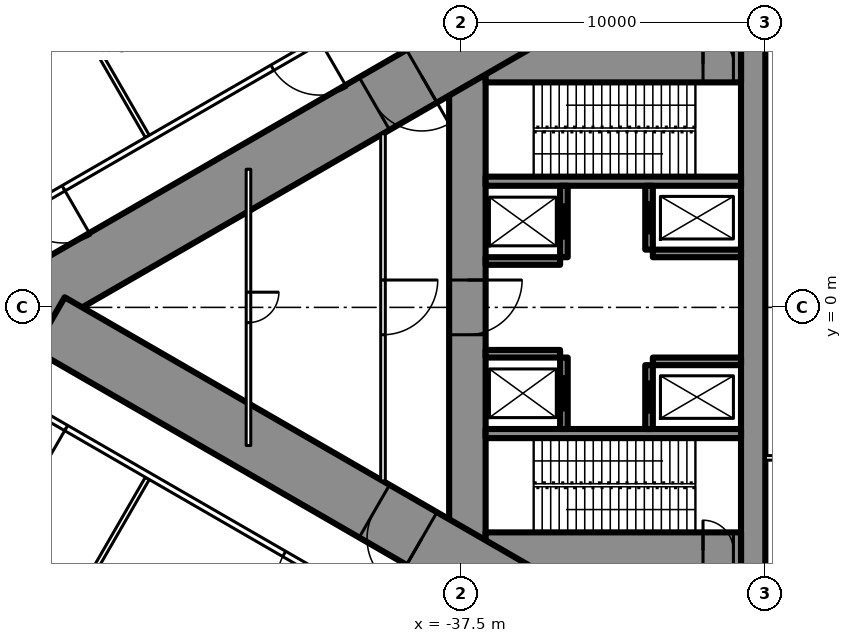
"""IFC4 building model, lengths in metres.
Left out: names, types, materials, properties, quantities, classifications, styles, units other than length and angle.
Written with IfcOpenShell. Run it as: python <this file> out.ifc"""

import sys

from ifc_helpers import new_model, si_unit, direction, frame, frame_2d, origin, place, context, subcontext, project, spatial, rectangle, extrude, element, fill, save


model = new_model("IFC4")
c1 = context("Model", 3, precision=1e-05, world=origin(), true_north=direction((0.0, 1.0)))
c2 = subcontext(c1, "Body", "Model", "MODEL_VIEW")
j1 = project(units=[si_unit("LENGTHUNIT", "METRE"), si_unit("PLANEANGLEUNIT", "RADIAN")], contexts=[c1])
p1 = place(None, origin())
s1 = spatial("IfcSite", under=j1, at=p1, CompositionType="ELEMENT")
p2 = place(p1, origin())
s2 = spatial("IfcBuilding", under=s1, at=p2, CompositionType="ELEMENT")
p3 = place(p2, origin())
s3 = spatial("IfcBuildingStorey", under=s2, at=p3, CompositionType="ELEMENT", Elevation=0.0)
p4 = place(p3, frame((-27.9, 8.6, 0.0), z_axis=(0.0, 0.0, 1.0), x_axis=(0.0, -1.0, 0.0)))
e1 = element("IfcWall", 1, at=p4, inside=s3, PredefinedType="SHEAR", context=c2, shape_type="SweptSolid", body=[
    extrude(rectangle(XDim=17.2, YDim=0.8, at=frame_2d((8.6, 0.0))), origin(), (0.0, 0.0, 1.0), 7.2),
])
p5 = place(p3, frame((-37.3, 8.6, 0.0), z_axis=(0.0, 0.0, 1.0), x_axis=(0.0, -1.0, 0.0)))
e2 = element("IfcWall", 2, at=p5, inside=s3, PredefinedType="SHEAR", context=c2, shape_type="SweptSolid", body=[
    extrude(rectangle(XDim=17.2, YDim=1.2, at=frame_2d((8.6, 0.0))), origin(), (0.0, 0.0, 1.0), 7.2),
])
p6 = place(p5, frame((7.7, 0.0, 0.0)))
e3 = element("IfcOpeningElement", 3, at=p6, cuts=e2, PredefinedType="OPENING", context=c2, shape_type="SweptSolid", body=[
    extrude(rectangle(XDim=1.8, YDim=2.2, at=frame_2d((0.9, 1.1))), frame((0.0, 0.61, 0.0), z_axis=(0.0, -1.0, 0.0), x_axis=(1.0, 0.0, 0.0)), (0.0, 0.0, 1.0), 1.22),
])
p7 = place(p3, frame((-28.3, 8.0, 0.0), z_axis=(0.0, 0.0, 1.0), x_axis=(-1.0, 0.0, 0.0)))
e4 = element("IfcWall", 4, at=p7, inside=s3, PredefinedType="SHEAR", context=c2, shape_type="SweptSolid", body=[
    extrude(rectangle(XDim=8.4, YDim=1.2, at=frame_2d((4.2, 0.0))), origin(), (0.0, 0.0, 1.0), 7.2),
])
p8 = place(p7, frame((0.25, 0.0, 0.0)))
e5 = element("IfcOpeningElement", 5, at=p8, cuts=e4, PredefinedType="OPENING", context=c2, shape_type="SweptSolid", body=[
    extrude(rectangle(XDim=1.0, YDim=2.2, at=frame_2d((0.5, 1.1))), frame((0.0, 0.61, 0.0), z_axis=(0.0, -1.0, 0.0), x_axis=(1.0, 0.0, 0.0)), (0.0, 0.0, 1.0), 1.22),
])
p9 = place(p3, frame((-28.3, -8.0, 0.0), z_axis=(0.0, 0.0, 1.0), x_axis=(-1.0, 0.0, 0.0)))
e6 = element("IfcWall", 6, at=p9, inside=s3, PredefinedType="SHEAR", context=c2, shape_type="SweptSolid", body=[
    extrude(rectangle(XDim=8.4, YDim=1.2, at=frame_2d((4.2, 0.0))), origin(), (0.0, 0.0, 1.0), 7.2),
])
p10 = place(p9, frame((0.25, 0.0, 0.0)))
e7 = element("IfcOpeningElement", 7, at=p10, cuts=e6, PredefinedType="OPENING", context=c2, shape_type="SweptSolid", body=[
    extrude(rectangle(XDim=1.0, YDim=2.2, at=frame_2d((0.5, 1.1))), frame((0.0, 0.61, 0.0), z_axis=(0.0, -1.0, 0.0), x_axis=(1.0, 0.0, 0.0)), (0.0, 0.0, 1.0), 1.22),
])
for number, where, z_axis, x_axis in (
    (8, (-28.3, 4.15, 0.0), (0.0, 0.0, 1.0), (-1.0, 0.0, 0.0)),
    (9, (-28.3, -4.15, 0.0), (0.0, 0.0, 1.0), (-1.0, 0.0, 0.0)),
):
    element("IfcWall", number, at=place(p3, frame(where, z_axis=z_axis, x_axis=x_axis)), inside=s3, PredefinedType="SHEAR", context=c2, shape_type="SweptSolid", body=[
        extrude(rectangle(XDim=8.4, YDim=0.3, at=frame_2d((4.2, 0.0))), origin(), (0.0, 0.0, 1.0), 7.2),
    ])
p11 = place(p3, frame((-31.325, 4.0, 0.0), z_axis=(0.0, 0.0, 1.0), x_axis=(0.0, -1.0, 0.0)))
e10 = element("IfcWall", 10, at=p11, inside=s3, PredefinedType="SHEAR", context=c2, shape_type="SweptSolid", body=[
    extrude(rectangle(XDim=2.1, YDim=0.25, at=frame_2d((1.05, 0.0))), origin(), (0.0, 0.0, 1.0), 7.2),
])
p12 = place(p11, frame((0.5, 0.0, 0.0)))
e11 = element("IfcOpeningElement", 11, at=p12, cuts=e10, PredefinedType="OPENING", context=c2, shape_type="SweptSolid", body=[
    extrude(rectangle(XDim=1.1, YDim=2.2, at=frame_2d((0.55, 1.1))), frame((0.0, 0.135, 0.0), z_axis=(0.0, -1.0, 0.0), x_axis=(1.0, 0.0, 0.0)), (0.0, 0.0, 1.0), 0.27),
])
p13 = place(p3, frame((-34.125, 4.0, 0.0), z_axis=(0.0, 0.0, 1.0), x_axis=(0.0, -1.0, 0.0)))
e12 = element("IfcWall", 12, at=p13, inside=s3, PredefinedType="SHEAR", context=c2, shape_type="SweptSolid", body=[
    extrude(rectangle(XDim=2.35, YDim=0.25, at=frame_2d((1.175, 0.0))), origin(), (0.0, 0.0, 1.0), 7.2),
])
p14 = place(p13, frame((0.575, 0.0, 0.0)))
e13 = element("IfcOpeningElement", 13, at=p14, cuts=e12, PredefinedType="OPENING", context=c2, shape_type="SweptSolid", body=[
    extrude(rectangle(XDim=1.2, YDim=2.2, at=frame_2d((0.6, 1.1))), frame((0.0, 0.135, 0.0), z_axis=(0.0, -1.0, 0.0), x_axis=(1.0, 0.0, 0.0)), (0.0, 0.0, 1.0), 0.27),
])
p15 = place(p3, frame((-28.3, 1.775, 0.0), z_axis=(0.0, 0.0, 1.0), x_axis=(-1.0, 0.0, 0.0)))
e14 = element("IfcWall", 14, at=p15, inside=s3, PredefinedType="SHEAR", context=c2, shape_type="SweptSolid", body=[
    extrude(rectangle(XDim=2.9, YDim=0.25, at=frame_2d((1.45, 0.0))), origin(), (0.0, 0.0, 1.0), 7.2),
])
p16 = place(p3, frame((-34.25, 1.525, 0.0), z_axis=(0.0, 0.0, 1.0), x_axis=(-1.0, 0.0, 0.0)))
e15 = element("IfcWall", 15, at=p16, inside=s3, PredefinedType="SHEAR", context=c2, shape_type="SweptSolid", body=[
    extrude(rectangle(XDim=2.45, YDim=0.25, at=frame_2d((1.225, 0.0))), origin(), (0.0, 0.0, 1.0), 7.2),
])
p17 = place(p3, frame((-31.325, -1.9, 0.0), z_axis=(0.0, 0.0, 1.0), x_axis=(0.0, -1.0, 0.0)))
e16 = element("IfcWall", 16, at=p17, inside=s3, PredefinedType="SHEAR", context=c2, shape_type="SweptSolid", body=[
    extrude(rectangle(XDim=2.1, YDim=0.25, at=frame_2d((1.05, 0.0))), origin(), (0.0, 0.0, 1.0), 7.2),
])
p18 = place(p17, frame((0.5, 0.0, 0.0)))
e17 = element("IfcOpeningElement", 17, at=p18, cuts=e16, PredefinedType="OPENING", context=c2, shape_type="SweptSolid", body=[
    extrude(rectangle(XDim=1.1, YDim=2.2, at=frame_2d((0.55, 1.1))), frame((0.0, 0.135, 0.0), z_axis=(0.0, -1.0, 0.0), x_axis=(1.0, 0.0, 0.0)), (0.0, 0.0, 1.0), 0.27),
])
p19 = place(p3, frame((-34.125, -1.65, 0.0), z_axis=(0.0, 0.0, 1.0), x_axis=(0.0, -1.0, 0.0)))
e18 = element("IfcWall", 18, at=p19, inside=s3, PredefinedType="SHEAR", context=c2, shape_type="SweptSolid", body=[
    extrude(rectangle(XDim=2.35, YDim=0.25, at=frame_2d((1.175, 0.0))), origin(), (0.0, 0.0, 1.0), 7.2),
])
p20 = place(p19, frame((0.575, 0.0, 0.0)))
e19 = element("IfcOpeningElement", 19, at=p20, cuts=e18, PredefinedType="OPENING", context=c2, shape_type="SweptSolid", body=[
    extrude(rectangle(XDim=1.2, YDim=2.2, at=frame_2d((0.6, 1.1))), frame((0.0, 0.135, 0.0), z_axis=(0.0, -1.0, 0.0), x_axis=(1.0, 0.0, 0.0)), (0.0, 0.0, 1.0), 0.27),
])
p21 = place(p3, frame((-28.3, -1.775, 0.0), z_axis=(0.0, 0.0, 1.0), x_axis=(-1.0, 0.0, 0.0)))
e20 = element("IfcWall", 20, at=p21, inside=s3, PredefinedType="SHEAR", context=c2, shape_type="SweptSolid", body=[
    extrude(rectangle(XDim=2.9, YDim=0.25, at=frame_2d((1.45, 0.0))), origin(), (0.0, 0.0, 1.0), 7.2),
])
p22 = place(p3, frame((-34.25, -1.525, 0.0), z_axis=(0.0, 0.0, 1.0), x_axis=(-1.0, 0.0, 0.0)))
e21 = element("IfcWall", 21, at=p22, inside=s3, PredefinedType="SHEAR", context=c2, shape_type="SweptSolid", body=[
    extrude(rectangle(XDim=2.45, YDim=0.25, at=frame_2d((1.225, 0.0))), origin(), (0.0, 0.0, 1.0), 7.2),
])
p23 = place(p3, frame((-27.2, 14.3, 0.0), z_axis=(0.0, 0.0, 1.0), x_axis=(-0.866026593062, -0.499997940104, 0.0)))
e22 = element("IfcWall", 22, at=p23, inside=s3, PredefinedType="SHEAR", context=c2, shape_type="SweptSolid", body=[
    extrude(rectangle(XDim=28.946, YDim=2.0, at=frame_2d((14.473, 0.0))), origin(), (0.0, 0.0, 1.0), 7.2),
])
p24 = place(p23, frame((4.6, 0.0, 0.0)))
e23 = element("IfcOpeningElement", 23, at=p24, cuts=e22, PredefinedType="OPENING", context=c2, shape_type="SweptSolid", body=[
    extrude(rectangle(XDim=1.0, YDim=2.2, at=frame_2d((0.5, 1.1))), frame((0.0, 1.01, 0.0), z_axis=(0.0, -1.0, 0.0), x_axis=(1.0, 0.0, 0.0)), (0.0, 0.0, 1.0), 2.02),
])
p25 = place(p23, frame((13.395, 0.0, 0.0)))
e24 = element("IfcOpeningElement", 24, at=p25, cuts=e22, PredefinedType="OPENING", context=c2, shape_type="SweptSolid", body=[
    extrude(rectangle(XDim=1.8, YDim=2.2, at=frame_2d((0.9, 1.1))), frame((0.0, 1.01, 0.0), z_axis=(0.0, -1.0, 0.0), x_axis=(1.0, 0.0, 0.0)), (0.0, 0.0, 1.0), 2.02),
])
p26 = place(p3, frame((-27.2, -14.3, 0.0), z_axis=(0.0, 0.0, 1.0), x_axis=(-0.866024044937, 0.500002353585, 0.0)))
e25 = element("IfcWall", 25, at=p26, inside=s3, PredefinedType="SHEAR", context=c2, shape_type="SweptSolid", body=[
    extrude(rectangle(XDim=27.533, YDim=2.0, at=frame_2d((13.767, 0.0))), origin(), (0.0, 0.0, 1.0), 7.2),
])
p27 = place(p26, frame((4.6, 0.0, 0.0)))
e26 = element("IfcOpeningElement", 26, at=p27, cuts=e25, PredefinedType="OPENING", context=c2, shape_type="SweptSolid", body=[
    extrude(rectangle(XDim=1.0, YDim=2.2, at=frame_2d((0.5, 1.1))), frame((0.0, 1.01, 0.0), z_axis=(0.0, -1.0, 0.0), x_axis=(1.0, 0.0, 0.0)), (0.0, 0.0, 1.0), 2.02),
])
p28 = place(p26, frame((13.395, 0.0, 0.0)))
e27 = element("IfcOpeningElement", 27, at=p28, cuts=e25, PredefinedType="OPENING", context=c2, shape_type="SweptSolid", body=[
    extrude(rectangle(XDim=1.8, YDim=2.2, at=frame_2d((0.9, 1.1))), frame((0.0, 1.01, 0.0), z_axis=(0.0, -1.0, 0.0), x_axis=(1.0, 0.0, 0.0)), (0.0, 0.0, 1.0), 2.02),
])
for number, where, z_axis, x_axis in (
    (28, (-47.827, 5.624, 0.0), (0.0, 0.0, 1.0), (-0.5, 0.866, 0.0)),
    (29, (-47.827, -5.624, 0.0), (0.0, 0.0, 1.0), (-0.5, -0.866, 0.0)),
):
    element("IfcWall", number, at=place(p3, frame(where, z_axis=z_axis, x_axis=x_axis)), inside=s3, PredefinedType="PARTITIONING", context=c2, shape_type="SweptSolid", body=[
        extrude(rectangle(XDim=9.11, YDim=0.15, at=frame_2d((4.555, 0.0))), origin(), (0.0, 0.0, 1.0), 5.85),
    ])
p29 = place(p3, frame((-37.9, 11.24, 0.0), z_axis=(0.0, 0.0, 1.0), x_axis=(-0.866022995118, -0.50000417191, 0.0)))
e30 = element("IfcWall", 30, at=p29, inside=s3, PredefinedType="PARTITIONING", context=c2, shape_type="SweptSolid", body=[
    extrude(rectangle(XDim=22.48, YDim=0.2, at=frame_2d((11.24, 0.0))), origin(), (0.0, 0.0, 1.0), 6.85),
])
p30 = place(p29, frame((14.644, 0.0, 0.0)))
e31 = element("IfcOpeningElement", 31, at=p30, cuts=e30, PredefinedType="OPENING", context=c2, shape_type="SweptSolid", body=[
    extrude(rectangle(XDim=1.8, YDim=2.2, at=frame_2d((0.9, 1.1))), frame((0.0, 0.11, 0.0), z_axis=(0.0, -1.0, 0.0), x_axis=(1.0, 0.0, 0.0)), (0.0, 0.0, 1.0), 0.22),
])
p31 = place(p29, frame((20.069, 0.0, 0.0)))
e32 = element("IfcOpeningElement", 32, at=p31, cuts=e30, PredefinedType="OPENING", context=c2, shape_type="SweptSolid", body=[
    extrude(rectangle(XDim=1.8, YDim=2.2, at=frame_2d((0.9, 1.1))), frame((0.0, 0.11, 0.0), z_axis=(0.0, -1.0, 0.0), x_axis=(1.0, 0.0, 0.0)), (0.0, 0.0, 1.0), 0.22),
])
p32 = place(p29, frame((4.915, 0.0, 0.0)))
e33 = element("IfcOpeningElement", 33, at=p32, cuts=e30, PredefinedType="OPENING", context=c2, shape_type="SweptSolid", body=[
    extrude(rectangle(XDim=1.8, YDim=2.2, at=frame_2d((0.9, 1.1))), frame((0.0, 0.11, 0.0), z_axis=(0.0, -1.0, 0.0), x_axis=(1.0, 0.0, 0.0)), (0.0, 0.0, 1.0), 0.22),
])
p33 = place(p3, frame((-37.12, -11.69, 0.0), z_axis=(0.0, 0.0, 1.0), x_axis=(-0.866028803602, 0.499994111297, 0.0)))
e34 = element("IfcWall", 34, at=p33, inside=s3, PredefinedType="PARTITIONING", context=c2, shape_type="SweptSolid", body=[
    extrude(rectangle(XDim=23.26, YDim=0.2, at=frame_2d((11.63, 0.0))), origin(), (0.0, 0.0, 1.0), 6.85),
])
p34 = place(p33, frame((20.909, 0.0, 0.0)))
e35 = element("IfcOpeningElement", 35, at=p34, cuts=e34, PredefinedType="OPENING", context=c2, shape_type="SweptSolid", body=[
    extrude(rectangle(XDim=1.8, YDim=2.2, at=frame_2d((0.9, 1.1))), frame((0.0, 0.11, 0.0), z_axis=(0.0, -1.0, 0.0), x_axis=(1.0, 0.0, 0.0)), (0.0, 0.0, 1.0), 0.22),
])
p35 = place(p33, frame((15.444, 0.0, 0.0)))
e36 = element("IfcOpeningElement", 36, at=p35, cuts=e34, PredefinedType="OPENING", context=c2, shape_type="SweptSolid", body=[
    extrude(rectangle(XDim=2.0, YDim=2.4, at=frame_2d((1.0, 1.2))), frame((0.0, 0.11, 0.0), z_axis=(0.0, -1.0, 0.0), x_axis=(1.0, 0.0, 0.0)), (0.0, 0.0, 1.0), 0.22),
])
p36 = place(p33, frame((5.365, 0.0, 0.0)))
e37 = element("IfcOpeningElement", 37, at=p36, cuts=e34, PredefinedType="OPENING", context=c2, shape_type="SweptSolid", body=[
    extrude(rectangle(XDim=1.8, YDim=2.2, at=frame_2d((0.9, 1.1))), frame((0.0, 0.11, 0.0), z_axis=(0.0, -1.0, 0.0), x_axis=(1.0, 0.0, 0.0)), (0.0, 0.0, 1.0), 0.22),
])
p37 = place(p3, frame((-40.075, 5.712, 0.0), z_axis=(0.0, 0.0, 1.0), x_axis=(0.0, -1.0, 0.0)))
e38 = element("IfcWall", 38, at=p37, inside=s3, PredefinedType="PARTITIONING", context=c2, shape_type="SweptSolid", body=[
    extrude(rectangle(XDim=11.424, YDim=0.15, at=frame_2d((5.712, 0.0))), origin(), (0.0, 0.0, 1.0), 6.85),
])
p38 = place(p37, frame((4.812, 0.0, 0.0)))
e39 = element("IfcOpeningElement", 39, at=p38, cuts=e38, PredefinedType="OPENING", context=c2, shape_type="SweptSolid", body=[
    extrude(rectangle(XDim=1.8, YDim=2.2, at=frame_2d((0.9, 1.1))), frame((0.0, 0.085, 0.0), z_axis=(0.0, -1.0, 0.0), x_axis=(1.0, 0.0, 0.0)), (0.0, 0.0, 1.0), 0.17),
])
p39 = place(p3, frame((-44.5, 4.543, 0.0), z_axis=(0.0, 0.0, 1.0), x_axis=(0.0, -1.0, 0.0)))
e40 = element("IfcWall", 40, at=p39, inside=s3, PredefinedType="PARTITIONING", context=c2, shape_type="SweptSolid", body=[
    extrude(rectangle(XDim=9.085, YDim=0.15, at=frame_2d((4.543, 0.0))), origin(), (0.0, 0.0, 1.0), 6.85),
])
p40 = place(p39, frame((4.043, 0.0, 0.0)))
e41 = element("IfcOpeningElement", 41, at=p40, cuts=e40, PredefinedType="OPENING", context=c2, shape_type="SweptSolid", body=[
    extrude(rectangle(XDim=1.0, YDim=2.2, at=frame_2d((0.5, 1.1))), frame((0.0, 0.085, 0.0), z_axis=(0.0, -1.0, 0.0), x_axis=(1.0, 0.0, 0.0)), (0.0, 0.0, 1.0), 0.17),
])
p41 = place(p3, frame((-27.5, -4.95, 0.0), z_axis=(0.0, 0.0, 1.0), x_axis=(1.0, 0.0, 0.0)))
e42 = element("IfcWall", 42, at=p41, inside=s3, PredefinedType="PARTITIONING", context=c2, shape_type="SweptSolid", body=[
    extrude(rectangle(XDim=22.875, YDim=0.15, at=frame_2d((11.438, 0.0))), origin(), (0.0, 0.0, 1.0), 5.85),
])
p42 = place(p41, frame((9.1, 0.0, 0.0)))
e43 = element("IfcOpeningElement", 43, at=p42, cuts=e42, PredefinedType="OPENING", context=c2, shape_type="SweptSolid", body=[
    extrude(rectangle(XDim=1.8, YDim=2.2, at=frame_2d((0.9, 1.1))), frame((0.0, 0.085, 0.0), z_axis=(0.0, -1.0, 0.0), x_axis=(1.0, 0.0, 0.0)), (0.0, 0.0, 1.0), 0.17),
])
p43 = place(p30, origin())
e44 = element("IfcDoor", 44, at=p43, inside=s3, OperationType="DOUBLE_DOOR_SINGLE_SWING", PredefinedType="DOOR", context=c2, shape_type="SweptSolid", body=[
    extrude(rectangle(XDim=1.8, YDim=2.2, at=frame_2d((0.9, 1.1))), frame((0.0, 0.025, 0.0), z_axis=(0.0, -1.0, 0.0), x_axis=(1.0, 0.0, 0.0)), (0.0, 0.0, 1.0), 0.05),
])
fill(e31, e44)
p44 = place(p35, origin())
e45 = element("IfcDoor", 45, at=p44, inside=s3, OperationType="DOUBLE_DOOR_SINGLE_SWING", PredefinedType="DOOR", context=c2, shape_type="SweptSolid", body=[
    extrude(rectangle(XDim=2.0, YDim=2.4, at=frame_2d((1.0, 1.2))), frame((0.0, 0.025, 0.0), z_axis=(0.0, -1.0, 0.0), x_axis=(1.0, 0.0, 0.0)), (0.0, 0.0, 1.0), 0.05),
])
fill(e36, e45)
p45 = place(p36, origin())
e46 = element("IfcDoor", 46, at=p45, inside=s3, OperationType="DOUBLE_DOOR_SINGLE_SWING", PredefinedType="DOOR", context=c2, shape_type="SweptSolid", body=[
    extrude(rectangle(XDim=1.8, YDim=2.2, at=frame_2d((0.9, 1.1))), frame((0.0, 0.025, 0.0), z_axis=(0.0, -1.0, 0.0), x_axis=(1.0, 0.0, 0.0)), (0.0, 0.0, 1.0), 0.05),
])
fill(e37, e46)
p46 = place(p32, origin())
e47 = element("IfcDoor", 47, at=p46, inside=s3, OperationType="DOUBLE_DOOR_SINGLE_SWING", PredefinedType="DOOR", context=c2, shape_type="SweptSolid", body=[
    extrude(rectangle(XDim=1.8, YDim=2.2, at=frame_2d((0.9, 1.1))), frame((0.0, 0.025, 0.0), z_axis=(0.0, -1.0, 0.0), x_axis=(1.0, 0.0, 0.0)), (0.0, 0.0, 1.0), 0.05),
])
fill(e33, e47)
p47 = place(p38, origin())
e48 = element("IfcDoor", 48, at=p47, inside=s3, OperationType="DOUBLE_DOOR_SINGLE_SWING", PredefinedType="DOOR", context=c2, shape_type="SweptSolid", body=[
    extrude(rectangle(XDim=1.8, YDim=2.2, at=frame_2d((0.9, 1.1))), frame((0.0, 0.025, 0.0), z_axis=(0.0, -1.0, 0.0), x_axis=(1.0, 0.0, 0.0)), (0.0, 0.0, 1.0), 0.05),
])
fill(e39, e48)
p48 = place(p40, origin())
e49 = element("IfcDoor", 49, at=p48, inside=s3, OperationType="SINGLE_SWING_LEFT", PredefinedType="DOOR", context=c2, shape_type="SweptSolid", body=[
    extrude(rectangle(XDim=1.0, YDim=2.2, at=frame_2d((0.5, 1.1))), frame((0.0, 0.025, 0.0), z_axis=(0.0, -1.0, 0.0), x_axis=(1.0, 0.0, 0.0)), (0.0, 0.0, 1.0), 0.05),
])
fill(e41, e49)
p49 = place(p25, origin())
e50 = element("IfcDoor", 50, at=p49, inside=s3, OperationType="DOUBLE_DOOR_SINGLE_SWING", PredefinedType="DOOR", context=c2, shape_type="SweptSolid", body=[
    extrude(rectangle(XDim=1.8, YDim=2.2, at=frame_2d((0.9, 1.1))), frame((0.0, 0.025, 0.0), z_axis=(0.0, -1.0, 0.0), x_axis=(1.0, 0.0, 0.0)), (0.0, 0.0, 1.0), 0.05),
])
fill(e24, e50)
p50 = place(p28, origin())
e51 = element("IfcDoor", 51, at=p50, inside=s3, OperationType="DOUBLE_DOOR_SINGLE_SWING", PredefinedType="DOOR", context=c2, shape_type="SweptSolid", body=[
    extrude(rectangle(XDim=1.8, YDim=2.2, at=frame_2d((0.9, 1.1))), frame((0.0, 0.025, 0.0), z_axis=(0.0, -1.0, 0.0), x_axis=(1.0, 0.0, 0.0)), (0.0, 0.0, 1.0), 0.05),
])
fill(e27, e51)
p51 = place(p6, origin())
e52 = element("IfcDoor", 52, at=p51, inside=s3, OperationType="DOUBLE_DOOR_SINGLE_SWING", PredefinedType="DOOR", context=c2, shape_type="SweptSolid", body=[
    extrude(rectangle(XDim=1.8, YDim=2.2, at=frame_2d((0.9, 1.1))), frame((0.0, 0.025, 0.0), z_axis=(0.0, -1.0, 0.0), x_axis=(1.0, 0.0, 0.0)), (0.0, 0.0, 1.0), 0.05),
])
fill(e3, e52)
p52 = place(p8, origin())
e53 = element("IfcDoor", 53, at=p52, inside=s3, OperationType="SINGLE_SWING_RIGHT", PredefinedType="DOOR", context=c2, shape_type="SweptSolid", body=[
    extrude(rectangle(XDim=1.0, YDim=2.2, at=frame_2d((0.5, 1.1))), frame((0.0, 0.025, 0.0), z_axis=(0.0, -1.0, 0.0), x_axis=(1.0, 0.0, 0.0)), (0.0, 0.0, 1.0), 0.05),
])
fill(e5, e53)
p53 = place(p10, origin())
e54 = element("IfcDoor", 54, at=p53, inside=s3, OperationType="SINGLE_SWING_RIGHT", PredefinedType="DOOR", context=c2, shape_type="SweptSolid", body=[
    extrude(rectangle(XDim=1.0, YDim=2.2, at=frame_2d((0.5, 1.1))), frame((0.0, 0.025, 0.0), z_axis=(0.0, -1.0, 0.0), x_axis=(1.0, 0.0, 0.0)), (0.0, 0.0, 1.0), 0.05),
])
fill(e7, e54)
p54 = place(p12, origin())
e55 = element("IfcDoor", 55, at=p54, inside=s3, OperationType="SLIDING_TO_LEFT", PredefinedType="USERDEFINED", context=c2, shape_type="SweptSolid", body=[
    extrude(rectangle(XDim=1.1, YDim=2.2, at=frame_2d((0.55, 1.1))), frame((0.0, 0.025, 0.0), z_axis=(0.0, -1.0, 0.0), x_axis=(1.0, 0.0, 0.0)), (0.0, 0.0, 1.0), 0.05),
])
fill(e11, e55)
p55 = place(p18, origin())
e56 = element("IfcDoor", 56, at=p55, inside=s3, OperationType="SLIDING_TO_LEFT", PredefinedType="USERDEFINED", context=c2, shape_type="SweptSolid", body=[
    extrude(rectangle(XDim=1.1, YDim=2.2, at=frame_2d((0.55, 1.1))), frame((0.0, 0.025, 0.0), z_axis=(0.0, -1.0, 0.0), x_axis=(1.0, 0.0, 0.0)), (0.0, 0.0, 1.0), 0.05),
])
fill(e17, e56)
p56 = place(p14, origin())
e57 = element("IfcDoor", 57, at=p56, inside=s3, OperationType="DOUBLE_DOOR_SLIDING", PredefinedType="USERDEFINED", context=c2, shape_type="SweptSolid", body=[
    extrude(rectangle(XDim=1.2, YDim=2.2, at=frame_2d((0.6, 1.1))), frame((0.0, 0.025, 0.0), z_axis=(0.0, -1.0, 0.0), x_axis=(1.0, 0.0, 0.0)), (0.0, 0.0, 1.0), 0.05),
])
fill(e13, e57)
p57 = place(p20, origin())
e58 = element("IfcDoor", 58, at=p57, inside=s3, OperationType="DOUBLE_DOOR_SLIDING", PredefinedType="USERDEFINED", context=c2, shape_type="SweptSolid", body=[
    extrude(rectangle(XDim=1.2, YDim=2.2, at=frame_2d((0.6, 1.1))), frame((0.0, 0.025, 0.0), z_axis=(0.0, -1.0, 0.0), x_axis=(1.0, 0.0, 0.0)), (0.0, 0.0, 1.0), 0.05),
])
fill(e19, e58)
save(model, sys.argv[1])
